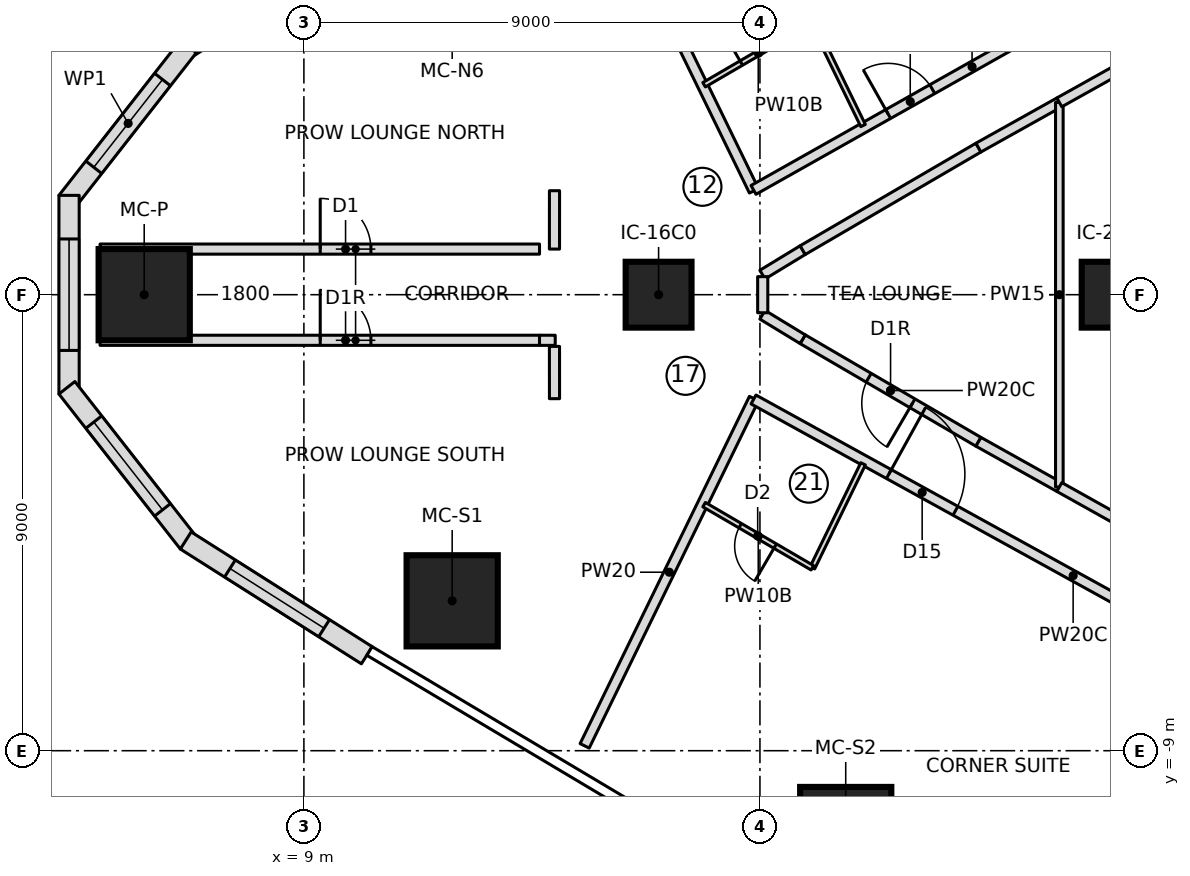
"""IFC4 building model, lengths in metres.
Left out: names, types, materials, properties, quantities, classifications, styles, units other than length and angle.
Written with IfcOpenShell. Run it as: python <this file> out.ifc"""

import sys

from ifc_helpers import new_model, si_unit, direction, frame, frame_2d, origin, origin_2d, place, context, subcontext, project, spatial, polyline, rectangle, outline, extrude, element, fill, save


model = new_model("IFC4")
c1 = context("Model", 3, precision=1e-05, world=origin(), true_north=direction((0.0, 1.0)))
c2 = subcontext(c1, "Body", "Model", "MODEL_VIEW")
j1 = project(units=[si_unit("LENGTHUNIT", "METRE"), si_unit("PLANEANGLEUNIT", "RADIAN")], contexts=[c1])
p1 = place(None, origin())
s1 = spatial("IfcSite", under=j1, at=p1, CompositionType="ELEMENT")
p2 = place(p1, origin())
s2 = spatial("IfcBuilding", under=s1, at=p2, CompositionType="ELEMENT")
p3 = place(p2, frame((0.0, 0.0, 39.6)))
s3 = spatial("IfcBuildingStorey", under=s2, at=p3, CompositionType="ELEMENT", Elevation=39.6)
for number, where, z_axis, x_axis in (
    (1, (5.848, 0.0, 0.0), (0.0, 0.0, 1.0), (1.0, 0.0, 0.0)),
    (2, (11.927, -6.042, 0.0), (0.0, 0.0, 1.0), (1.0, 0.0, 0.0)),
    (3, (19.693, -10.615, 0.0), (0.0, 0.0, 1.0), (1.0, 0.0, 0.0)),
):
    element("IfcColumn", number, at=place(p3, frame(where, z_axis=z_axis, x_axis=x_axis)), inside=s3, PredefinedType="COLUMN", context=c2, shape_type="SweptSolid", body=[
        extrude(rectangle(XDim=1.8, YDim=1.8, at=origin_2d()), origin(), (0.0, 0.0, 1.0), 3.55),
    ])
for number, where, z_axis, x_axis in (
    (4, (16.0, 0.0, 0.0), (0.0, 0.0, 1.0), (1.0, 0.0, 0.0)),
    (5, (25.0, 0.0, 0.0), (0.0, 0.0, 1.0), (1.0, 0.0, 0.0)),
):
    element("IfcColumn", number, at=place(p3, frame(where, z_axis=z_axis, x_axis=x_axis)), inside=s3, PredefinedType="COLUMN", context=c2, shape_type="SweptSolid", body=[
        extrude(rectangle(XDim=1.3, YDim=1.3, at=origin_2d()), origin(), (0.0, 0.0, 1.0), 3.55),
    ])
p4 = place(p3, frame((10.242, 7.116, 0.0), z_axis=(0.0, 0.0, 1.0), x_axis=(-0.844551578623, -0.535474211372, 0.0)))
e6 = element("IfcWall", 6, at=p4, inside=s3, PredefinedType="NOTDEFINED", context=c2, shape_type="SweptSolid", body=[
    extrude(outline(polyline([(0.0, -0.2), (4.23, -0.2), (4.162, 0.2), (0.0, 0.2), (0.0, -0.2)])), origin(), (0.0, 0.0, 1.0), 3.25),
])
p5 = place(p4, frame((0.998, 0.0, 0.6)))
e7 = element("IfcOpeningElement", 7, at=p5, cuts=e6, PredefinedType="OPENING", context=c2, shape_type="SweptSolid", body=[
    extrude(outline(polyline([(0.0, 1.35), (0.084, 1.771), (0.322, 2.128), (0.679, 2.366), (1.1, 2.45), (1.521, 2.366), (1.878, 2.128), (2.116, 1.771), (2.2, 1.35), (2.2, 1.1), (2.116, 0.679), (1.878, 0.322), (1.521, 0.084), (1.1, 0.0), (0.679, 0.084), (0.322, 0.322), (0.084, 0.679), (0.0, 1.1), (0.0, 1.35)])), frame((0.0, 0.21, 0.0), z_axis=(0.0, -1.0, 0.0), x_axis=(1.0, 0.0, 0.0)), (0.0, 0.0, 1.0), 0.42),
])
p6 = place(p3, frame((6.698, 4.87, 0.0), z_axis=(0.0, 0.0, 1.0), x_axis=(-0.616586647779, -0.787287054245, 0.0)))
e8 = element("IfcWall", 8, at=p6, inside=s3, PredefinedType="NOTDEFINED", context=c2, shape_type="SweptSolid", body=[
    extrude(outline(polyline([(-0.034, -0.2), (3.852, -0.2), (3.714, 0.2), (0.034, 0.2), (-0.034, -0.2)])), origin(), (0.0, 0.0, 1.0), 3.25),
])
p7 = place(p6, frame((0.792, 0.0, 0.6)))
e9 = element("IfcOpeningElement", 9, at=p7, cuts=e8, PredefinedType="OPENING", context=c2, shape_type="SweptSolid", body=[
    extrude(outline(polyline([(0.0, 1.35), (0.084, 1.771), (0.322, 2.128), (0.679, 2.366), (1.1, 2.45), (1.521, 2.366), (1.878, 2.128), (2.116, 1.771), (2.2, 1.35), (2.2, 1.1), (2.116, 0.679), (1.878, 0.322), (1.521, 0.084), (1.1, 0.0), (0.679, 0.084), (0.322, 0.322), (0.084, 0.679), (0.0, 1.1), (0.0, 1.35)])), frame((0.0, 0.21, 0.0), z_axis=(0.0, -1.0, 0.0), x_axis=(1.0, 0.0, 0.0)), (0.0, 0.0, 1.0), 0.42),
])
p8 = place(p3, frame((4.365, 1.891, 0.0), z_axis=(0.0, 0.0, 1.0), x_axis=(0.0, -1.0, 0.0)))
e10 = element("IfcWall", 10, at=p8, inside=s3, PredefinedType="NOTDEFINED", context=c2, shape_type="SweptSolid", body=[
    extrude(outline(polyline([(-0.069, -0.2), (3.852, -0.2), (3.714, 0.2), (0.069, 0.2), (-0.069, -0.2)])), origin(), (0.0, 0.0, 1.0), 3.25),
])
p9 = place(p8, frame((0.792, 0.0, 0.6)))
e11 = element("IfcOpeningElement", 11, at=p9, cuts=e10, PredefinedType="OPENING", context=c2, shape_type="SweptSolid", body=[
    extrude(outline(polyline([(0.0, 1.35), (0.084, 1.771), (0.322, 2.128), (0.679, 2.366), (1.1, 2.45), (1.521, 2.366), (1.878, 2.128), (2.116, 1.771), (2.2, 1.35), (2.2, 1.1), (2.116, 0.679), (1.878, 0.322), (1.521, 0.084), (1.1, 0.0), (0.679, 0.084), (0.322, 0.322), (0.084, 0.679), (0.0, 1.1), (0.0, 1.35)])), frame((0.0, 0.21, 0.0), z_axis=(0.0, -1.0, 0.0), x_axis=(1.0, 0.0, 0.0)), (0.0, 0.0, 1.0), 0.42),
])
p10 = place(p3, frame((4.365, -1.891, 0.0), z_axis=(0.0, 0.0, 1.0), x_axis=(0.616586647779, -0.787287054245, 0.0)))
e12 = element("IfcWall", 12, at=p10, inside=s3, PredefinedType="NOTDEFINED", context=c2, shape_type="SweptSolid", body=[
    extrude(outline(polyline([(-0.069, -0.2), (3.817, -0.2), (3.749, 0.2), (0.069, 0.2), (-0.069, -0.2)])), origin(), (0.0, 0.0, 1.0), 3.25),
])
p11 = place(p10, frame((0.792, 0.0, 0.6)))
e13 = element("IfcOpeningElement", 13, at=p11, cuts=e12, PredefinedType="OPENING", context=c2, shape_type="SweptSolid", body=[
    extrude(outline(polyline([(0.0, 1.35), (0.084, 1.771), (0.322, 2.128), (0.679, 2.366), (1.1, 2.45), (1.521, 2.366), (1.878, 2.128), (2.116, 1.771), (2.2, 1.35), (2.2, 1.1), (2.116, 0.679), (1.878, 0.322), (1.521, 0.084), (1.1, 0.0), (0.679, 0.084), (0.322, 0.322), (0.084, 0.679), (0.0, 1.1), (0.0, 1.35)])), frame((0.0, 0.21, 0.0), z_axis=(0.0, -1.0, 0.0), x_axis=(1.0, 0.0, 0.0)), (0.0, 0.0, 1.0), 0.42),
])
p12 = place(p3, frame((6.698, -4.87, 0.0), z_axis=(0.0, 0.0, 1.0), x_axis=(0.844551578623, -0.535474211372, 0.0)))
e14 = element("IfcWall", 14, at=p12, inside=s3, PredefinedType="NOTDEFINED", context=c2, shape_type="SweptSolid", body=[
    extrude(outline(polyline([(-0.034, -0.2), (4.196, -0.2), (4.196, 0.2), (0.034, 0.2), (-0.034, -0.2)])), origin(), (0.0, 0.0, 1.0), 3.25),
])
p13 = place(p12, frame((0.998, 0.0, 0.6)))
e15 = element("IfcOpeningElement", 15, at=p13, cuts=e14, PredefinedType="OPENING", context=c2, shape_type="SweptSolid", body=[
    extrude(outline(polyline([(0.0, 1.35), (0.084, 1.771), (0.322, 2.128), (0.679, 2.366), (1.1, 2.45), (1.521, 2.366), (1.878, 2.128), (2.116, 1.771), (2.2, 1.35), (2.2, 1.1), (2.116, 0.679), (1.878, 0.322), (1.521, 0.084), (1.1, 0.0), (0.679, 0.084), (0.322, 0.322), (0.084, 0.679), (0.0, 1.1), (0.0, 1.35)])), frame((0.0, 0.21, 0.0), z_axis=(0.0, -1.0, 0.0), x_axis=(1.0, 0.0, 0.0)), (0.0, 0.0, 1.0), 0.42),
])
p14 = place(p3, frame((17.882, 2.05, 0.0), z_axis=(0.0, 0.0, 1.0), x_axis=(-0.438213564788, 0.898870887078, 0.0)))
e16 = element("IfcWall", 16, at=p14, inside=s3, PredefinedType="PARTITIONING", context=c2, shape_type="SweptSolid", body=[
    extrude(rectangle(XDim=7.625, YDim=0.2, at=frame_2d((3.813, 0.0))), origin(), (0.0, 0.0, 1.0), 3.25),
])
p15 = place(p3, frame((17.874, 2.068, 0.0), z_axis=(0.0, 0.0, 1.0), x_axis=(0.871165632804, 0.490989246544, 0.0)))
e17 = element("IfcWall", 17, at=p15, inside=s3, PredefinedType="PARTITIONING", context=c2, shape_type="SweptSolid", body=[
    extrude(rectangle(XDim=9.901, YDim=0.2, at=frame_2d((4.951, 0.0))), origin(), (0.0, 0.0, 1.0), 3.25),
])
p16 = place(p15, frame((3.05, 0.0, 0.0)))
e18 = element("IfcOpeningElement", 18, at=p16, cuts=e17, PredefinedType="OPENING", context=c2, shape_type="SweptSolid", body=[
    extrude(rectangle(XDim=1.0, YDim=2.1, at=frame_2d((0.5, 1.05))), frame((0.0, 0.11, 0.0), z_axis=(0.0, -1.0, 0.0), x_axis=(1.0, 0.0, 0.0)), (0.0, 0.0, 1.0), 0.22),
])
p17 = place(p3, frame((16.898, 4.144, 0.0), z_axis=(0.0, 0.0, 1.0), x_axis=(0.863707305865, 0.503993739837, 0.0)))
e19 = element("IfcWall", 19, at=p17, inside=s3, PredefinedType="PARTITIONING", context=c2, shape_type="SweptSolid", body=[
    extrude(rectangle(XDim=2.474, YDim=0.1, at=frame_2d((1.237, 0.0))), origin(), (0.0, 0.0, 1.0), 3.25),
])
p18 = place(p17, frame((0.85, 0.0, 0.0)))
e20 = element("IfcOpeningElement", 20, at=p18, cuts=e19, PredefinedType="OPENING", context=c2, shape_type="SweptSolid", body=[
    extrude(rectangle(XDim=0.8, YDim=2.1, at=frame_2d((0.4, 1.05))), frame((0.0, 0.06, 0.0), z_axis=(0.0, -1.0, 0.0), x_axis=(1.0, 0.0, 0.0)), (0.0, 0.0, 1.0), 0.12),
])
p19 = place(p3, frame((19.035, 5.39, 0.0), z_axis=(0.0, 0.0, 1.0), x_axis=(0.438122322582, -0.898915363344, 0.0)))
e21 = element("IfcWall", 21, at=p19, inside=s3, PredefinedType="PARTITIONING", context=c2, shape_type="SweptSolid", body=[
    extrude(rectangle(XDim=2.283, YDim=0.1, at=frame_2d((1.142, 0.0))), origin(), (0.0, 0.0, 1.0), 3.25),
])
p20 = place(p3, frame((14.541, -8.904, 0.0), z_axis=(0.0, 0.0, 1.0), x_axis=(0.438213564788, 0.898870887078, 0.0)))
e22 = element("IfcWall", 22, at=p20, inside=s3, PredefinedType="PARTITIONING", context=c2, shape_type="SweptSolid", body=[
    extrude(rectangle(XDim=7.625, YDim=0.2, at=frame_2d((3.813, 0.0))), origin(), (0.0, 0.0, 1.0), 3.25),
])
p21 = place(p3, frame((17.874, -2.068, 0.0), z_axis=(0.0, 0.0, 1.0), x_axis=(0.875757832755, -0.482750679305, 0.0)))
e23 = element("IfcWall", 23, at=p21, inside=s3, PredefinedType="PARTITIONING", context=c2, shape_type="SweptSolid", body=[
    extrude(rectangle(XDim=14.405, YDim=0.2, at=frame_2d((7.202, 0.0))), origin(), (0.0, 0.0, 1.0), 3.25),
])
p22 = place(p21, frame((3.05, 0.0, 0.0)))
e24 = element("IfcOpeningElement", 24, at=p22, cuts=e23, PredefinedType="OPENING", context=c2, shape_type="SweptSolid", body=[
    extrude(rectangle(XDim=1.5, YDim=2.1, at=frame_2d((0.75, 1.05))), frame((0.0, 0.11, 0.0), z_axis=(0.0, -1.0, 0.0), x_axis=(1.0, 0.0, 0.0)), (0.0, 0.0, 1.0), 0.22),
])
p23 = place(p3, frame((20.035, -3.338, 0.0), z_axis=(0.0, 0.0, 1.0), x_axis=(-0.438122322582, -0.898915363344, 0.0)))
e25 = element("IfcWall", 25, at=p23, inside=s3, PredefinedType="PARTITIONING", context=c2, shape_type="SweptSolid", body=[
    extrude(rectangle(XDim=2.283, YDim=0.1, at=frame_2d((1.142, 0.0))), origin(), (0.0, 0.0, 1.0), 3.25),
])
p24 = place(p3, frame((19.035, -5.39, 0.0), z_axis=(0.0, 0.0, 1.0), x_axis=(-0.863707305865, 0.503993739837, 0.0)))
e26 = element("IfcWall", 26, at=p24, inside=s3, PredefinedType="PARTITIONING", context=c2, shape_type="SweptSolid", body=[
    extrude(rectangle(XDim=2.474, YDim=0.1, at=frame_2d((1.237, 0.0))), origin(), (0.0, 0.0, 1.0), 3.25),
])
p25 = place(p24, frame((0.85, 0.0, 0.0)))
e27 = element("IfcOpeningElement", 27, at=p25, cuts=e26, PredefinedType="OPENING", context=c2, shape_type="SweptSolid", body=[
    extrude(rectangle(XDim=0.8, YDim=2.1, at=frame_2d((0.4, 1.05))), frame((0.0, 0.06, 0.0), z_axis=(0.0, -1.0, 0.0), x_axis=(1.0, 0.0, 0.0)), (0.0, 0.0, 1.0), 0.12),
])
p26 = place(p3, frame((22.312, -2.903, 0.0), z_axis=(0.0, 0.0, 1.0), x_axis=(-0.863710538269, 0.503988200341, 0.0)))
e28 = element("IfcWall", 28, at=p26, inside=s3, PredefinedType="PARTITIONING", context=c2, shape_type="SweptSolid", body=[
    extrude(rectangle(XDim=4.016, YDim=0.2, at=frame_2d((2.008, 0.0))), origin(), (0.0, 0.0, 1.0), 3.25),
])
p27 = place(p26, frame((1.508, 0.0, 0.0)))
e29 = element("IfcOpeningElement", 29, at=p27, cuts=e28, PredefinedType="OPENING", context=c2, shape_type="SweptSolid", body=[
    extrude(rectangle(XDim=1.0, YDim=2.1, at=frame_2d((0.5, 1.05))), frame((0.0, 0.11, 0.0), z_axis=(0.0, -1.0, 0.0), x_axis=(1.0, 0.0, 0.0)), (0.0, 0.0, 1.0), 0.22),
])
for number, where, z_axis, x_axis in (
    (30, (18.844, -0.879, 0.0), (0.0, 0.0, 1.0), (-0.854, 0.52, 0.0)),
    (31, (18.05, 0.396, 0.0), (0.0, 0.0, 1.0), (0.854, 0.52, 0.0)),
):
    element("IfcWall", number, at=place(p3, frame(where, z_axis=z_axis, x_axis=x_axis)), inside=s3, PredefinedType="PARTITIONING", context=c2, shape_type="SweptSolid", body=[
        extrude(rectangle(XDim=0.929, YDim=0.2, at=frame_2d((0.464, 0.0))), origin(), (0.0, 0.0, 1.0), 3.25),
    ])
p28 = place(p3, frame((18.844, 0.879, 0.0), z_axis=(0.0, 0.0, 1.0), x_axis=(0.863710538269, 0.503988200341, 0.0)))
e32 = element("IfcWall", 32, at=p28, inside=s3, PredefinedType="PARTITIONING", context=c2, shape_type="SweptSolid", body=[
    extrude(rectangle(XDim=4.016, YDim=0.2, at=frame_2d((2.008, 0.0))), origin(), (0.0, 0.0, 1.0), 3.25),
])
for number, where, z_axis, x_axis in (
    (33, (22.312, 2.903, 0.0), (0.0, 0.0, 1.0), (0.873, 0.488, 0.0)),
    (34, (23.909, -3.796, 0.0), (0.0, 0.0, 1.0), (-0.873, 0.488, 0.0)),
):
    element("IfcWall", number, at=place(p3, frame(where, z_axis=z_axis, x_axis=x_axis)), inside=s3, PredefinedType="PARTITIONING", context=c2, shape_type="SweptSolid", body=[
        extrude(rectangle(XDim=1.829, YDim=0.2, at=frame_2d((0.915, 0.0))), origin(), (0.0, 0.0, 1.0), 3.25),
    ])
p29 = place(p3, frame((23.909, -3.796, 0.0), z_axis=(0.0, 0.0, 1.0), x_axis=(0.0, 1.0, 0.0)))
e35 = element("IfcWall", 35, at=p29, inside=s3, PredefinedType="PARTITIONING", context=c2, shape_type="SweptSolid", body=[
    extrude(rectangle(XDim=7.592, YDim=0.15, at=frame_2d((3.796, 0.0))), origin(), (0.0, 0.0, 1.0), 3.25),
])
for number, where, z_axis, x_axis in (
    (36, (25.817, -4.863, 0.0), (0.0, 0.0, 1.0), (-0.873, 0.488, 0.0)),
    (37, (23.909, 3.796, 0.0), (0.0, 0.0, 1.0), (0.873, 0.488, 0.0)),
):
    element("IfcWall", number, at=place(p3, frame(where, z_axis=z_axis, x_axis=x_axis)), inside=s3, PredefinedType="PARTITIONING", context=c2, shape_type="SweptSolid", body=[
        extrude(rectangle(XDim=2.186, YDim=0.2, at=frame_2d((1.093, 0.0))), origin(), (0.0, 0.0, 1.0), 3.25),
    ])
p30 = place(p3, frame((4.977, 0.9, 0.0), z_axis=(0.0, 0.0, 1.0), x_axis=(1.0, 0.0, 0.0)))
e38 = element("IfcWall", 38, at=p30, inside=s3, PredefinedType="PARTITIONING", context=c2, shape_type="SweptSolid", body=[
    extrude(rectangle(XDim=8.673, YDim=0.2, at=frame_2d((4.336, 0.0))), origin(), (0.0, 0.0, 1.0), 3.25),
])
p31 = place(p30, frame((4.345, 0.0, 0.0)))
e39 = element("IfcOpeningElement", 39, at=p31, cuts=e38, PredefinedType="OPENING", context=c2, shape_type="SweptSolid", body=[
    extrude(rectangle(XDim=1.0, YDim=2.1, at=frame_2d((0.5, 1.05))), frame((0.0, 0.11, 0.0), z_axis=(0.0, -1.0, 0.0), x_axis=(1.0, 0.0, 0.0)), (0.0, 0.0, 1.0), 0.22),
])
p32 = place(p3, frame((4.977, -0.9, 0.0), z_axis=(0.0, 0.0, 1.0), x_axis=(1.0, 0.0, 0.0)))
e40 = element("IfcWall", 40, at=p32, inside=s3, PredefinedType="PARTITIONING", context=c2, shape_type="SweptSolid", body=[
    extrude(rectangle(XDim=8.673, YDim=0.2, at=frame_2d((4.336, 0.0))), origin(), (0.0, 0.0, 1.0), 3.25),
])
p33 = place(p32, frame((4.345, 0.0, 0.0)))
e41 = element("IfcOpeningElement", 41, at=p33, cuts=e40, PredefinedType="OPENING", context=c2, shape_type="SweptSolid", body=[
    extrude(rectangle(XDim=1.0, YDim=2.1, at=frame_2d((0.5, 1.05))), frame((0.0, 0.11, 0.0), z_axis=(0.0, -1.0, 0.0), x_axis=(1.0, 0.0, 0.0)), (0.0, 0.0, 1.0), 0.22),
])
p34 = place(p3, frame((18.055, -0.357, 0.0), z_axis=(0.0, 0.0, 1.0), x_axis=(0.0, 1.0, 0.0)))
e42 = element("IfcWall", 42, at=p34, inside=s3, PredefinedType="PARTITIONING", context=c2, shape_type="SweptSolid", body=[
    extrude(rectangle(XDim=0.713, YDim=0.2, at=frame_2d((0.357, 0.0))), origin(), (0.0, 0.0, 1.0), 3.25),
])
p35 = place(p3, frame((13.946, 2.052, 0.0), z_axis=(0.0, 0.0, 1.0), x_axis=(-0.000423818568, -0.999999910189, 0.0)))
e43 = element("IfcWall", 43, at=p35, inside=s3, PredefinedType="PARTITIONING", context=c2, shape_type="SweptSolid", body=[
    extrude(rectangle(XDim=1.152, YDim=0.2, at=frame_2d((0.576, 0.0))), origin(), (0.0, 0.0, 1.0), 3.25),
])
p36 = place(p3, frame((13.65, -0.9, 0.0), z_axis=(0.0, 0.0, 1.0), x_axis=(0.99999876, -0.001574801197, 0.0)))
e44 = element("IfcWall", 44, at=p36, inside=s3, PredefinedType="PARTITIONING", context=c2, shape_type="SweptSolid", body=[
    extrude(rectangle(XDim=0.31, YDim=0.2, at=frame_2d((0.155, 0.0))), origin(), (0.0, 0.0, 1.0), 3.25),
])
p37 = place(p3, frame((13.945, -1.021, 0.0), z_axis=(0.0, 0.0, 1.0), x_axis=(0.000473148752, -0.999999888065, 0.0)))
e45 = element("IfcWall", 45, at=p37, inside=s3, PredefinedType="PARTITIONING", context=c2, shape_type="SweptSolid", body=[
    extrude(rectangle(XDim=1.032, YDim=0.2, at=frame_2d((0.516, 0.0))), origin(), (0.0, 0.0, 1.0), 3.25),
])
p38 = place(p7, origin())
e46 = element("IfcWindow", 46, at=p38, inside=s3, PartitioningType="SINGLE_PANEL", PredefinedType="WINDOW", context=c2, shape_type="SweptSolid", body=[
    extrude(outline(polyline([(0.0, 1.35), (0.084, 1.771), (0.322, 2.128), (0.679, 2.366), (1.1, 2.45), (1.521, 2.366), (1.878, 2.128), (2.116, 1.771), (2.2, 1.35), (2.2, 1.1), (2.116, 0.679), (1.878, 0.322), (1.521, 0.084), (1.1, 0.0), (0.679, 0.084), (0.322, 0.322), (0.084, 0.679), (0.0, 1.1), (0.0, 1.35)])), frame((0.0, 0.17, 0.0), z_axis=(0.0, -1.0, 0.0), x_axis=(1.0, 0.0, 0.0)), (0.0, 0.0, 1.0), 0.06),
])
fill(e9, e46)
p39 = place(p9, origin())
e47 = element("IfcWindow", 47, at=p39, inside=s3, PartitioningType="SINGLE_PANEL", PredefinedType="WINDOW", context=c2, shape_type="SweptSolid", body=[
    extrude(outline(polyline([(0.0, 1.35), (0.084, 1.771), (0.322, 2.128), (0.679, 2.366), (1.1, 2.45), (1.521, 2.366), (1.878, 2.128), (2.116, 1.771), (2.2, 1.35), (2.2, 1.1), (2.116, 0.679), (1.878, 0.322), (1.521, 0.084), (1.1, 0.0), (0.679, 0.084), (0.322, 0.322), (0.084, 0.679), (0.0, 1.1), (0.0, 1.35)])), frame((0.0, 0.17, 0.0), z_axis=(0.0, -1.0, 0.0), x_axis=(1.0, 0.0, 0.0)), (0.0, 0.0, 1.0), 0.06),
])
fill(e11, e47)
p40 = place(p11, origin())
e48 = element("IfcWindow", 48, at=p40, inside=s3, PartitioningType="SINGLE_PANEL", PredefinedType="WINDOW", context=c2, shape_type="SweptSolid", body=[
    extrude(outline(polyline([(0.0, 1.35), (0.084, 1.771), (0.322, 2.128), (0.679, 2.366), (1.1, 2.45), (1.521, 2.366), (1.878, 2.128), (2.116, 1.771), (2.2, 1.35), (2.2, 1.1), (2.116, 0.679), (1.878, 0.322), (1.521, 0.084), (1.1, 0.0), (0.679, 0.084), (0.322, 0.322), (0.084, 0.679), (0.0, 1.1), (0.0, 1.35)])), frame((0.0, 0.17, 0.0), z_axis=(0.0, -1.0, 0.0), x_axis=(1.0, 0.0, 0.0)), (0.0, 0.0, 1.0), 0.06),
])
fill(e13, e48)
p41 = place(p13, origin())
e49 = element("IfcWindow", 49, at=p41, inside=s3, PartitioningType="SINGLE_PANEL", PredefinedType="WINDOW", context=c2, shape_type="SweptSolid", body=[
    extrude(outline(polyline([(0.0, 1.35), (0.084, 1.771), (0.322, 2.128), (0.679, 2.366), (1.1, 2.45), (1.521, 2.366), (1.878, 2.128), (2.116, 1.771), (2.2, 1.35), (2.2, 1.1), (2.116, 0.679), (1.878, 0.322), (1.521, 0.084), (1.1, 0.0), (0.679, 0.084), (0.322, 0.322), (0.084, 0.679), (0.0, 1.1), (0.0, 1.35)])), frame((0.0, 0.17, 0.0), z_axis=(0.0, -1.0, 0.0), x_axis=(1.0, 0.0, 0.0)), (0.0, 0.0, 1.0), 0.06),
])
fill(e15, e49)
p42 = place(p31, origin())
e50 = element("IfcDoor", 50, at=p42, inside=s3, OperationType="SINGLE_SWING_LEFT", PredefinedType="DOOR", context=c2, shape_type="SweptSolid", body=[
    extrude(rectangle(XDim=1.0, YDim=2.1, at=frame_2d((0.5, 1.05))), frame((0.0, 0.025, 0.0), z_axis=(0.0, -1.0, 0.0), x_axis=(1.0, 0.0, 0.0)), (0.0, 0.0, 1.0), 0.05),
])
fill(e39, e50)
p43 = place(p33, origin())
e51 = element("IfcDoor", 51, at=p43, inside=s3, OperationType="SINGLE_SWING_RIGHT", PredefinedType="DOOR", context=c2, shape_type="SweptSolid", body=[
    extrude(rectangle(XDim=1.0, YDim=2.1, at=frame_2d((0.5, 1.05))), frame((0.0, 0.025, 0.0), z_axis=(0.0, -1.0, 0.0), x_axis=(1.0, 0.0, 0.0)), (0.0, 0.0, 1.0), 0.05),
])
fill(e41, e51)
p44 = place(p18, origin())
e52 = element("IfcDoor", 52, at=p44, inside=s3, OperationType="SINGLE_SWING_LEFT", PredefinedType="DOOR", context=c2, shape_type="SweptSolid", body=[
    extrude(rectangle(XDim=0.8, YDim=2.1, at=frame_2d((0.4, 1.05))), frame((0.0, 0.025, 0.0), z_axis=(0.0, -1.0, 0.0), x_axis=(1.0, 0.0, 0.0)), (0.0, 0.0, 1.0), 0.05),
])
fill(e20, e52)
p45 = place(p16, origin())
e53 = element("IfcDoor", 53, at=p45, inside=s3, OperationType="SINGLE_SWING_RIGHT", PredefinedType="DOOR", context=c2, shape_type="SweptSolid", body=[
    extrude(rectangle(XDim=1.0, YDim=2.1, at=frame_2d((0.5, 1.05))), frame((0.0, 0.025, 0.0), z_axis=(0.0, -1.0, 0.0), x_axis=(1.0, 0.0, 0.0)), (0.0, 0.0, 1.0), 0.05),
])
fill(e18, e53)
p46 = place(p25, origin())
e54 = element("IfcDoor", 54, at=p46, inside=s3, OperationType="SINGLE_SWING_LEFT", PredefinedType="DOOR", context=c2, shape_type="SweptSolid", body=[
    extrude(rectangle(XDim=0.8, YDim=2.1, at=frame_2d((0.4, 1.05))), frame((0.0, 0.025, 0.0), z_axis=(0.0, -1.0, 0.0), x_axis=(1.0, 0.0, 0.0)), (0.0, 0.0, 1.0), 0.05),
])
fill(e27, e54)
p47 = place(p22, origin())
e55 = element("IfcDoor", 55, at=p47, inside=s3, OperationType="DOUBLE_DOOR_SINGLE_SWING", PredefinedType="DOOR", context=c2, shape_type="SweptSolid", body=[
    extrude(rectangle(XDim=1.5, YDim=2.1, at=frame_2d((0.75, 1.05))), frame((0.0, 0.025, 0.0), z_axis=(0.0, -1.0, 0.0), x_axis=(1.0, 0.0, 0.0)), (0.0, 0.0, 1.0), 0.05),
])
fill(e24, e55)
p48 = place(p27, origin())
e56 = element("IfcDoor", 56, at=p48, inside=s3, OperationType="SINGLE_SWING_RIGHT", PredefinedType="DOOR", context=c2, shape_type="SweptSolid", body=[
    extrude(rectangle(XDim=1.0, YDim=2.1, at=frame_2d((0.5, 1.05))), frame((0.0, 0.025, 0.0), z_axis=(0.0, -1.0, 0.0), x_axis=(1.0, 0.0, 0.0)), (0.0, 0.0, 1.0), 0.05),
])
fill(e29, e56)
save(model, sys.argv[1])
